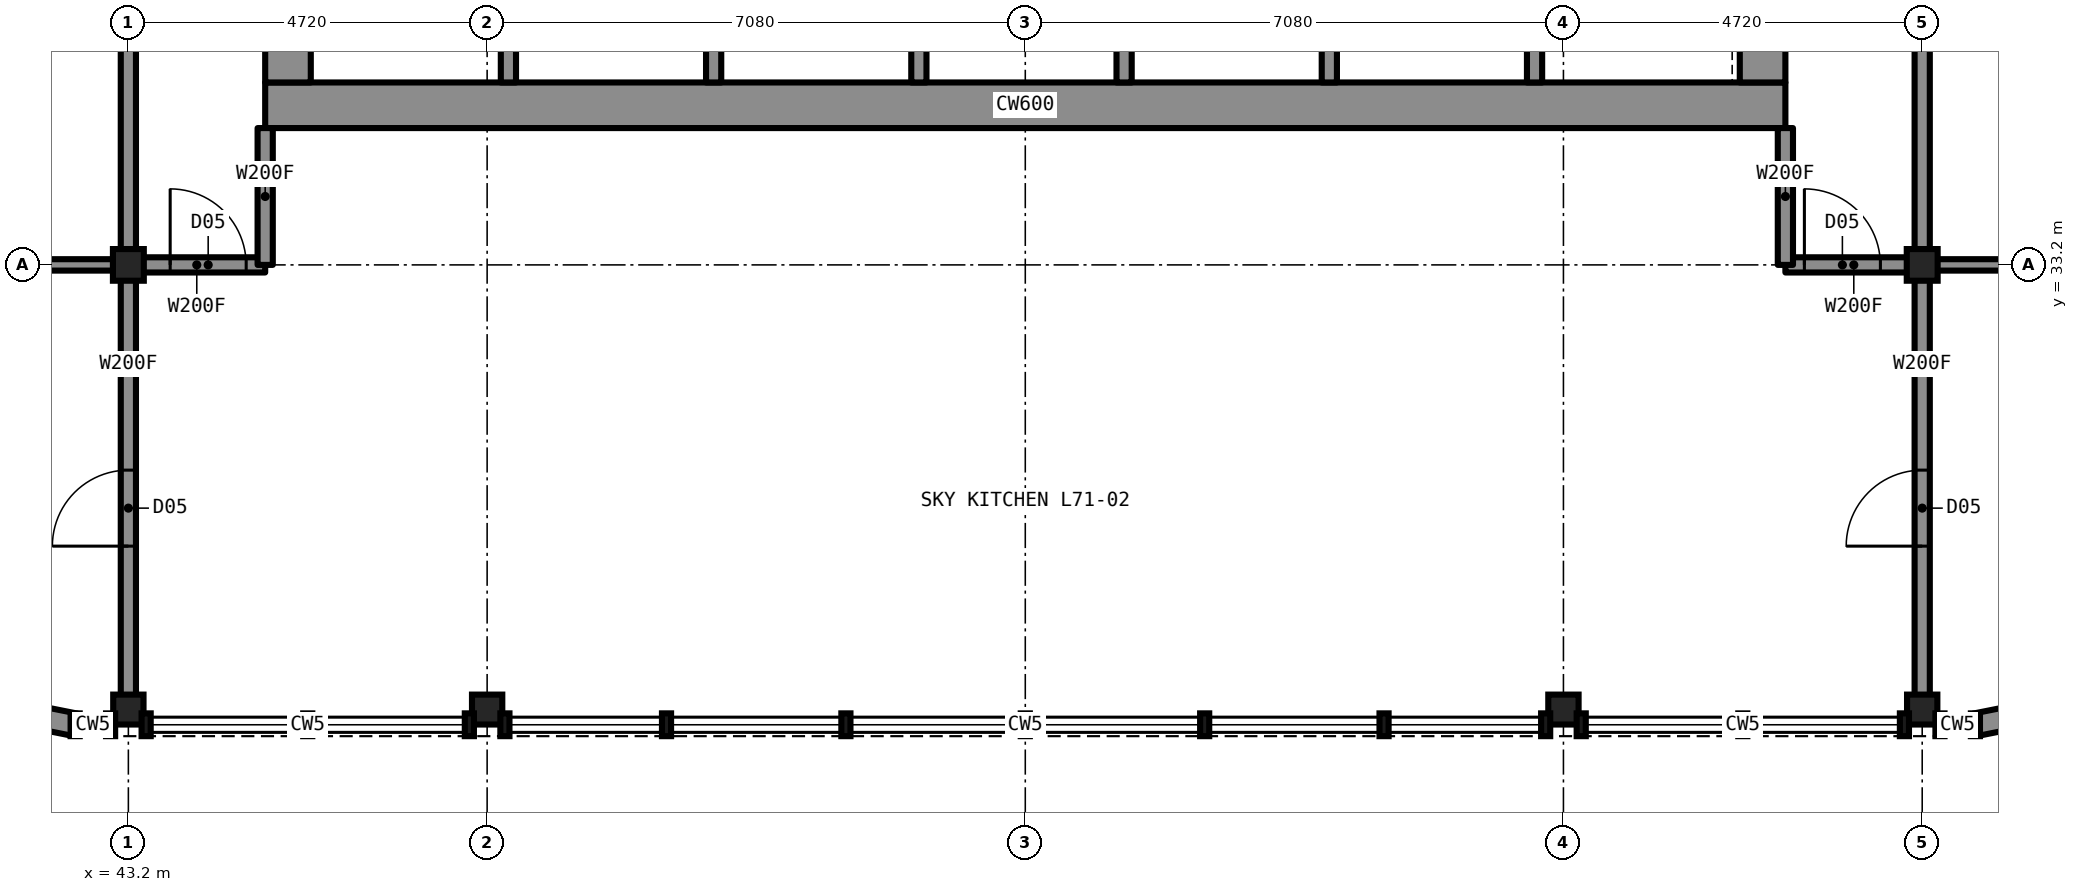
"""IFC4 building model, lengths in metres.
Left out: names, types, materials, properties, quantities, classifications, styles, units other than length and angle.
Written with IfcOpenShell. Run it as: python <this file> out.ifc"""

import sys

from ifc_helpers import new_model, si_unit, direction, frame, frame_2d, origin, origin_2d, place, context, subcontext, project, spatial, rectangle, i_section, extrude, element, fill, save


model = new_model("IFC4")
c1 = context("Model", 3, precision=1e-05, world=origin(), true_north=direction((0.0, 1.0)))
c2 = subcontext(c1, "Body", "Model", "MODEL_VIEW")
j1 = project(units=[si_unit("LENGTHUNIT", "METRE"), si_unit("PLANEANGLEUNIT", "RADIAN")], contexts=[c1])
p1 = place(None, origin())
s1 = spatial("IfcSite", under=j1, at=p1, CompositionType="ELEMENT")
p2 = place(p1, origin())
s2 = spatial("IfcBuilding", under=s1, at=p2, CompositionType="ELEMENT")
p3 = place(p2, frame((0.0, 0.0, 261.7)))
s3 = spatial("IfcBuildingStorey", under=s2, at=p3, CompositionType="ELEMENT", Elevation=261.7)
for number, where, z_axis, x_axis in (
    (1, (43.2, 27.35, 0.0), (0.0, 0.0, 1.0), (1.0, 0.0, 0.0)),
    (2, (47.92, 27.35, 0.0), (0.0, 0.0, 1.0), (1.0, 0.0, 0.0)),
    (3, (62.08, 27.35, 0.0), (0.0, 0.0, 1.0), (1.0, 0.0, 0.0)),
    (4, (66.8, 27.35, 0.0), (0.0, 0.0, 1.0), (1.0, 0.0, 0.0)),
):
    element("IfcColumn", number, at=place(p3, frame(where, z_axis=z_axis, x_axis=x_axis)), inside=s3, PredefinedType="COLUMN", context=c2, shape_type="SweptSolid", body=[
        extrude(i_section(OverallWidth=0.399, OverallDepth=0.394, WebThickness=0.023, FlangeThickness=0.037, at=origin_2d()), origin(), (0.0, 0.0, 1.0), 5.0),
    ])
for number, where, z_axis, x_axis in (
    (5, (43.2, 33.2, 0.0), (0.0, 0.0, 1.0), (1.0, 0.0, 0.0)),
    (6, (66.8, 33.2, 0.0), (0.0, 0.0, 1.0), (1.0, 0.0, 0.0)),
):
    element("IfcColumn", number, at=place(p3, frame(where, z_axis=z_axis, x_axis=x_axis)), inside=s3, PredefinedType="COLUMN", context=c2, shape_type="SweptSolid", body=[
        extrude(i_section(OverallWidth=0.406, OverallDepth=0.417, WebThickness=0.03, FlangeThickness=0.048, at=origin_2d()), origin(), (0.0, 0.0, 1.0), 5.0),
    ])
p4 = place(p3, frame((45.0, 35.3, 0.0), z_axis=(0.0, 0.0, 1.0), x_axis=(1.0, 0.0, 0.0)))
e7 = element("IfcWall", 7, at=p4, inside=s3, PredefinedType="SHEAR", context=c2, shape_type="SweptSolid", body=[
    extrude(rectangle(XDim=20.0, YDim=0.6, at=frame_2d((10.0, 0.0))), origin(), (0.0, 0.0, 1.0), 5.0),
])
p5 = place(p3, frame((64.7, 35.6, 0.0), z_axis=(0.0, 0.0, 1.0), x_axis=(0.0, 1.0, 0.0)))
e8 = element("IfcWall", 8, at=p5, inside=s3, PredefinedType="SHEAR", context=c2, shape_type="SweptSolid", body=[
    extrude(rectangle(XDim=18.8, YDim=0.6, at=frame_2d((9.4, 0.0))), origin(), (0.0, 0.0, 1.0), 5.0),
])
p6 = place(p5, frame((13.4, 0.0, 0.0)))
e9 = element("IfcOpeningElement", 9, at=p6, cuts=e8, PredefinedType="OPENING", context=c2, shape_type="SweptSolid", body=[
    extrude(rectangle(XDim=1.8, YDim=2.2, at=frame_2d((0.9, 1.1))), frame((0.0, 0.31, 0.0), z_axis=(0.0, -1.0, 0.0), x_axis=(1.0, 0.0, 0.0)), (0.0, 0.0, 1.0), 0.62),
])
p7 = place(p5, frame((3.6, 0.0, 0.0)))
e10 = element("IfcOpeningElement", 10, at=p7, cuts=e8, PredefinedType="OPENING", context=c2, shape_type="SweptSolid", body=[
    extrude(rectangle(XDim=1.8, YDim=2.2, at=frame_2d((0.9, 1.1))), frame((0.0, 0.31, 0.0), z_axis=(0.0, -1.0, 0.0), x_axis=(1.0, 0.0, 0.0)), (0.0, 0.0, 1.0), 0.62),
])
p8 = place(p3, frame((45.3, 35.6, 0.0), z_axis=(0.0, 0.0, 1.0), x_axis=(0.0, 1.0, 0.0)))
e11 = element("IfcWall", 11, at=p8, inside=s3, PredefinedType="SHEAR", context=c2, shape_type="SweptSolid", body=[
    extrude(rectangle(XDim=18.8, YDim=0.6, at=frame_2d((9.4, 0.0))), origin(), (0.0, 0.0, 1.0), 5.0),
])
p9 = place(p8, frame((13.4, 0.0, 0.0)))
e12 = element("IfcOpeningElement", 12, at=p9, cuts=e11, PredefinedType="OPENING", context=c2, shape_type="SweptSolid", body=[
    extrude(rectangle(XDim=1.8, YDim=2.2, at=frame_2d((0.9, 1.1))), frame((0.0, 0.31, 0.0), z_axis=(0.0, -1.0, 0.0), x_axis=(1.0, 0.0, 0.0)), (0.0, 0.0, 1.0), 0.62),
])
p10 = place(p8, frame((3.6, 0.0, 0.0)))
e13 = element("IfcOpeningElement", 13, at=p10, cuts=e11, PredefinedType="OPENING", context=c2, shape_type="SweptSolid", body=[
    extrude(rectangle(XDim=1.8, YDim=2.2, at=frame_2d((0.9, 1.1))), frame((0.0, 0.31, 0.0), z_axis=(0.0, -1.0, 0.0), x_axis=(1.0, 0.0, 0.0)), (0.0, 0.0, 1.0), 0.62),
])
p11 = place(p8, frame((6.4, 0.0, 0.0)))
e14 = element("IfcOpeningElement", 14, at=p11, cuts=e11, PredefinedType="OPENING", context=c2, shape_type="SweptSolid", body=[
    extrude(rectangle(XDim=1.2, YDim=2.2, at=frame_2d((0.6, 1.1))), frame((0.0, 0.31, 0.0), z_axis=(0.0, -1.0, 0.0), x_axis=(1.0, 0.0, 0.0)), (0.0, 0.0, 1.0), 0.62),
])
p12 = place(p3, frame((43.2, 33.2, 0.0), z_axis=(0.0, 0.0, 1.0), x_axis=(1.0, 0.0, 0.0)))
e15 = element("IfcWall", 15, at=p12, inside=s3, PredefinedType="PARTITIONING", context=c2, shape_type="SweptSolid", body=[
    extrude(rectangle(XDim=1.8, YDim=0.2, at=frame_2d((0.9, 0.0))), origin(), (0.0, 0.0, 1.0), 4.83),
])
p13 = place(p12, frame((0.55, 0.0, 0.0)))
e16 = element("IfcOpeningElement", 16, at=p13, cuts=e15, PredefinedType="OPENING", context=c2, shape_type="SweptSolid", body=[
    extrude(rectangle(XDim=1.0, YDim=2.1, at=frame_2d((0.5, 1.05))), frame((0.0, 0.11, 0.0), z_axis=(0.0, -1.0, 0.0), x_axis=(1.0, 0.0, 0.0)), (0.0, 0.0, 1.0), 0.22),
])
p14 = place(p3, frame((65.0, 33.2, 0.0), z_axis=(0.0, 0.0, 1.0), x_axis=(1.0, 0.0, 0.0)))
e17 = element("IfcWall", 17, at=p14, inside=s3, PredefinedType="PARTITIONING", context=c2, shape_type="SweptSolid", body=[
    extrude(rectangle(XDim=1.8, YDim=0.2, at=frame_2d((0.9, 0.0))), origin(), (0.0, 0.0, 1.0), 4.83),
])
p15 = place(p14, frame((0.25, 0.0, 0.0)))
e18 = element("IfcOpeningElement", 18, at=p15, cuts=e17, PredefinedType="OPENING", context=c2, shape_type="SweptSolid", body=[
    extrude(rectangle(XDim=1.0, YDim=2.1, at=frame_2d((0.5, 1.05))), frame((0.0, 0.11, 0.0), z_axis=(0.0, -1.0, 0.0), x_axis=(1.0, 0.0, 0.0)), (0.0, 0.0, 1.0), 0.22),
])
for number, where, z_axis, x_axis in (
    (19, (37.3, 33.2, 0.0), (0.0, 0.0, 1.0), (1.0, 0.0, 0.0)),
    (20, (66.8, 33.2, 0.0), (0.0, 0.0, 1.0), (1.0, 0.0, 0.0)),
):
    element("IfcWall", number, at=place(p3, frame(where, z_axis=z_axis, x_axis=x_axis)), inside=s3, PredefinedType="PARTITIONING", context=c2, shape_type="SweptSolid", body=[
        extrude(rectangle(XDim=5.9, YDim=0.15, at=frame_2d((2.95, 0.0))), origin(), (0.0, 0.0, 1.0), 4.068),
    ])
p16 = place(p3, frame((45.0, 33.2, 0.0), z_axis=(0.0, 0.0, 1.0), x_axis=(0.0, 1.0, 0.0)))
e21 = element("IfcWall", 21, at=p16, inside=s3, PredefinedType="PARTITIONING", context=c2, shape_type="SweptSolid", body=[
    extrude(rectangle(XDim=1.8, YDim=0.2, at=frame_2d((0.9, 0.0))), origin(), (0.0, 0.0, 1.0), 4.83),
])
p17 = place(p3, frame((43.2, 33.2, 0.0), z_axis=(0.0, 0.0, 1.0), x_axis=(0.0, 1.0, 0.0)))
e22 = element("IfcWall", 22, at=p17, inside=s3, PredefinedType="PARTITIONING", context=c2, shape_type="SweptSolid", body=[
    extrude(rectangle(XDim=23.6, YDim=0.2, at=frame_2d((11.8, 0.0))), origin(), (0.0, 0.0, 1.0), 4.83),
])
p18 = place(p17, frame((20.74, 0.0, 0.0)))
e23 = element("IfcOpeningElement", 23, at=p18, cuts=e22, PredefinedType="OPENING", context=c2, shape_type="SweptSolid", body=[
    extrude(rectangle(XDim=1.0, YDim=2.1, at=frame_2d((0.5, 1.05))), frame((0.0, 0.11, 0.0), z_axis=(0.0, -1.0, 0.0), x_axis=(1.0, 0.0, 0.0)), (0.0, 0.0, 1.0), 0.22),
])
p19 = place(p17, frame((4.35, 0.0, 0.0)))
e24 = element("IfcOpeningElement", 24, at=p19, cuts=e22, PredefinedType="OPENING", context=c2, shape_type="SweptSolid", body=[
    extrude(rectangle(XDim=0.9, YDim=2.1, at=frame_2d((0.45, 1.05))), frame((0.0, 0.11, 0.0), z_axis=(0.0, -1.0, 0.0), x_axis=(1.0, 0.0, 0.0)), (0.0, 0.0, 1.0), 0.22),
])
p20 = place(p17, frame((13.75, 0.0, 0.0)))
e25 = element("IfcOpeningElement", 25, at=p20, cuts=e22, PredefinedType="OPENING", context=c2, shape_type="SweptSolid", body=[
    extrude(rectangle(XDim=0.9, YDim=2.1, at=frame_2d((0.45, 1.05))), frame((0.0, 0.11, 0.0), z_axis=(0.0, -1.0, 0.0), x_axis=(1.0, 0.0, 0.0)), (0.0, 0.0, 1.0), 0.22),
])
p21 = place(p3, frame((43.2, 27.3, 0.0), z_axis=(0.0, 0.0, 1.0), x_axis=(0.0, 1.0, 0.0)))
e26 = element("IfcWall", 26, at=p21, inside=s3, PredefinedType="PARTITIONING", context=c2, shape_type="SweptSolid", body=[
    extrude(rectangle(XDim=5.9, YDim=0.2, at=frame_2d((2.95, 0.0))), origin(), (0.0, 0.0, 1.0), 4.068),
])
p22 = place(p21, frame((2.2, 0.0, 0.0)))
e27 = element("IfcOpeningElement", 27, at=p22, cuts=e26, PredefinedType="OPENING", context=c2, shape_type="SweptSolid", body=[
    extrude(rectangle(XDim=1.0, YDim=2.1, at=frame_2d((0.5, 1.05))), frame((0.0, 0.11, 0.0), z_axis=(0.0, -1.0, 0.0), x_axis=(1.0, 0.0, 0.0)), (0.0, 0.0, 1.0), 0.22),
])
p23 = place(p3, frame((65.0, 33.2, 0.0), z_axis=(0.0, 0.0, 1.0), x_axis=(0.0, 1.0, 0.0)))
e28 = element("IfcWall", 28, at=p23, inside=s3, PredefinedType="PARTITIONING", context=c2, shape_type="SweptSolid", body=[
    extrude(rectangle(XDim=1.8, YDim=0.2, at=frame_2d((0.9, 0.0))), origin(), (0.0, 0.0, 1.0), 4.83),
])
p24 = place(p3, frame((66.8, 33.2, 0.0), z_axis=(0.0, 0.0, 1.0), x_axis=(0.0, 1.0, 0.0)))
e29 = element("IfcWall", 29, at=p24, inside=s3, PredefinedType="PARTITIONING", context=c2, shape_type="SweptSolid", body=[
    extrude(rectangle(XDim=23.6, YDim=0.2, at=frame_2d((11.8, 0.0))), origin(), (0.0, 0.0, 1.0), 4.83),
])
p25 = place(p24, frame((11.3, 0.0, 0.0)))
e30 = element("IfcOpeningElement", 30, at=p25, cuts=e29, PredefinedType="OPENING", context=c2, shape_type="SweptSolid", body=[
    extrude(rectangle(XDim=1.0, YDim=2.1, at=frame_2d((0.5, 1.05))), frame((0.0, 0.11, 0.0), z_axis=(0.0, -1.0, 0.0), x_axis=(1.0, 0.0, 0.0)), (0.0, 0.0, 1.0), 0.22),
])
p26 = place(p3, frame((66.8, 27.3, 0.0), z_axis=(0.0, 0.0, 1.0), x_axis=(0.0, 1.0, 0.0)))
e31 = element("IfcWall", 31, at=p26, inside=s3, PredefinedType="PARTITIONING", context=c2, shape_type="SweptSolid", body=[
    extrude(rectangle(XDim=5.9, YDim=0.2, at=frame_2d((2.95, 0.0))), origin(), (0.0, 0.0, 1.0), 4.068),
])
p27 = place(p26, frame((2.2, 0.0, 0.0)))
e32 = element("IfcOpeningElement", 32, at=p27, cuts=e31, PredefinedType="OPENING", context=c2, shape_type="SweptSolid", body=[
    extrude(rectangle(XDim=1.0, YDim=2.1, at=frame_2d((0.5, 1.05))), frame((0.0, 0.11, 0.0), z_axis=(0.0, -1.0, 0.0), x_axis=(1.0, 0.0, 0.0)), (0.0, 0.0, 1.0), 0.22),
])
for number, where, z_axis, x_axis in (
    (33, (48.2, 35.6, 0.0), (0.0, 0.0, 1.0), (0.0, 1.0, 0.0)),
    (34, (50.9, 35.6, 0.0), (0.0, 0.0, 1.0), (0.0, 1.0, 0.0)),
    (35, (53.6, 35.6, 0.0), (0.0, 0.0, 1.0), (0.0, 1.0, 0.0)),
    (36, (56.3, 35.6, 0.0), (0.0, 0.0, 1.0), (0.0, 1.0, 0.0)),
    (37, (59.0, 35.6, 0.0), (0.0, 0.0, 1.0), (0.0, 1.0, 0.0)),
    (38, (61.7, 35.6, 0.0), (0.0, 0.0, 1.0), (0.0, 1.0, 0.0)),
):
    element("IfcWall", number, at=place(p3, frame(where, z_axis=z_axis, x_axis=x_axis)), inside=s3, PredefinedType="PARTITIONING", context=c2, shape_type="SweptSolid", body=[
        extrude(rectangle(XDim=2.7, YDim=0.2, at=frame_2d((1.35, 0.0))), origin(), (0.0, 0.0, 1.0), 4.83),
    ])
for number, where, z_axis, x_axis in (
    (39, (67.5, 27.15, 0.0), (0.0, 0.0, 1.0), (0.981, 0.195, 0.0)),
    (40, (40.453, 27.557, 0.0), (0.0, 0.0, 1.0), (0.981, -0.195, 0.0)),
):
    element("IfcWall", number, at=place(p3, frame(where, z_axis=z_axis, x_axis=x_axis)), inside=s3, PredefinedType="SOLIDWALL", context=c2, shape_type="SweptSolid", body=[
        extrude(rectangle(XDim=2.087, YDim=0.3, at=frame_2d((1.044, 0.0))), origin(), (0.0, 0.0, 1.0), 4.83),
    ])
p28 = place(p13, origin())
e41 = element("IfcDoor", 41, at=p28, inside=s3, OperationType="SINGLE_SWING_LEFT", PredefinedType="DOOR", context=c2, shape_type="SweptSolid", body=[
    extrude(rectangle(XDim=1.0, YDim=2.1, at=frame_2d((0.5, 1.05))), frame((0.0, 0.025, 0.0), z_axis=(0.0, -1.0, 0.0), x_axis=(1.0, 0.0, 0.0)), (0.0, 0.0, 1.0), 0.05),
])
fill(e16, e41)
p29 = place(p15, origin())
e42 = element("IfcDoor", 42, at=p29, inside=s3, OperationType="SINGLE_SWING_LEFT", PredefinedType="DOOR", context=c2, shape_type="SweptSolid", body=[
    extrude(rectangle(XDim=1.0, YDim=2.1, at=frame_2d((0.5, 1.05))), frame((0.0, 0.025, 0.0), z_axis=(0.0, -1.0, 0.0), x_axis=(1.0, 0.0, 0.0)), (0.0, 0.0, 1.0), 0.05),
])
fill(e18, e42)
p30 = place(p27, origin())
e43 = element("IfcDoor", 43, at=p30, inside=s3, OperationType="SINGLE_SWING_LEFT", PredefinedType="DOOR", context=c2, shape_type="SweptSolid", body=[
    extrude(rectangle(XDim=1.0, YDim=2.1, at=frame_2d((0.5, 1.05))), frame((0.0, 0.025, 0.0), z_axis=(0.0, -1.0, 0.0), x_axis=(1.0, 0.0, 0.0)), (0.0, 0.0, 1.0), 0.05),
])
fill(e32, e43)
p31 = place(p22, origin())
e44 = element("IfcDoor", 44, at=p31, inside=s3, OperationType="SINGLE_SWING_LEFT", PredefinedType="DOOR", context=c2, shape_type="SweptSolid", body=[
    extrude(rectangle(XDim=1.0, YDim=2.1, at=frame_2d((0.5, 1.05))), frame((0.0, 0.025, 0.0), z_axis=(0.0, -1.0, 0.0), x_axis=(1.0, 0.0, 0.0)), (0.0, 0.0, 1.0), 0.05),
])
fill(e27, e44)
save(model, sys.argv[1])
